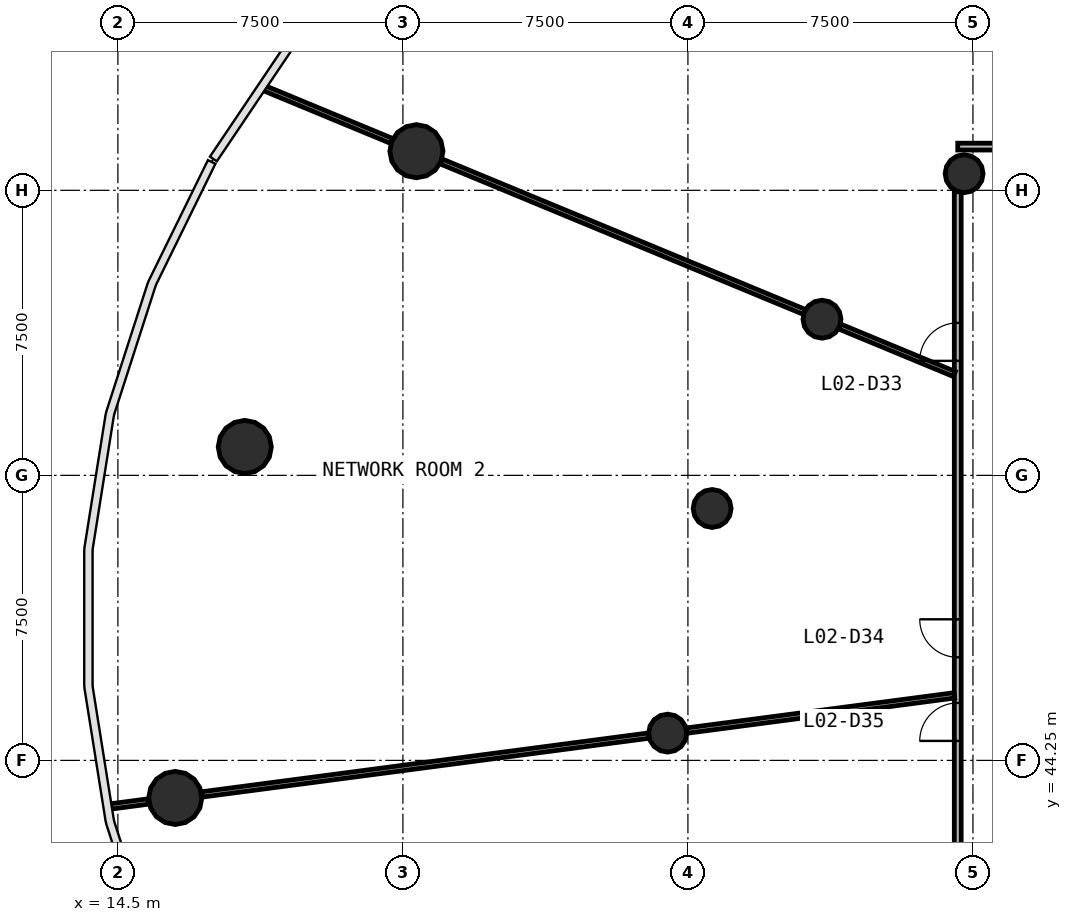
"""IFC4 building model, lengths in metres.
Left out: names, types, materials, properties, quantities, classifications, styles, units other than length and angle.
Written with IfcOpenShell. Run it as: python <this file> out.ifc"""

import sys

from ifc_helpers import new_model, si_unit, direction, frame, frame_2d, origin, origin_2d, place, context, subcontext, project, spatial, rectangle, circle, extrude, source, transform, mapped, element, fill, save


model = new_model("IFC4")
c1 = context("Model", 3, precision=1e-05, world=origin(), true_north=direction((0.0, 1.0)))
c2 = subcontext(c1, "Body", "Model", "MODEL_VIEW")
j1 = project(units=[si_unit("LENGTHUNIT", "METRE"), si_unit("PLANEANGLEUNIT", "RADIAN")], contexts=[c1])
p1 = place(None, origin())
s1 = spatial("IfcSite", under=j1, at=p1, CompositionType="ELEMENT")
p2 = place(p1, origin())
s2 = spatial("IfcBuilding", under=s1, at=p2, CompositionType="ELEMENT")
p3 = place(p2, frame((0.0, 0.0, 9.4)))
s3 = spatial("IfcBuildingStorey", under=s2, at=p3, CompositionType="ELEMENT", Elevation=9.4)
m1 = source(origin(), c2, "Body", "SweptSolid", [
    extrude(circle(Radius=0.7, at=origin_2d()), origin(), (0.0, 0.0, 1.0), 4.4),
])
for number, where, z_axis, x_axis in (
    (1, (22.355, 60.279, 0.0), (0.0, 0.0, 1.0), (1.0, 0.0, 0.0)),
    (2, (17.839, 52.497, 0.0), (0.0, 0.0, 1.0), (1.0, 0.0, 0.0)),
    (3, (16.01, 43.262, 0.0), (0.0, 0.0, 1.0), (1.0, 0.0, 0.0)),
):
    element("IfcColumn", number, at=place(p3, frame(where, z_axis=z_axis, x_axis=x_axis)), inside=s3, PredefinedType="COLUMN", context=c2, shape_type="MappedRepresentation", body=[
        mapped(m1, transform((0.0, 0.0, 0.0), scale=1.0)),
    ])
m2 = source(origin(), c2, "Body", "SweptSolid", [
    extrude(circle(Radius=0.5, at=origin_2d()), origin(), (0.0, 0.0, 1.0), 4.4),
])
for number, where, z_axis, x_axis in (
    (4, (36.768, 59.688, 0.0), (0.0, 0.0, 1.0), (1.0, 0.0, 0.0)),
    (5, (33.028, 55.859, 0.0), (0.0, 0.0, 1.0), (1.0, 0.0, 0.0)),
    (6, (30.137, 50.878, 0.0), (0.0, 0.0, 1.0), (1.0, 0.0, 0.0)),
    (7, (28.966, 44.968, 0.0), (0.0, 0.0, 1.0), (1.0, 0.0, 0.0)),
):
    element("IfcColumn", number, at=place(p3, frame(where, z_axis=z_axis, x_axis=x_axis)), inside=s3, PredefinedType="COLUMN", context=c2, shape_type="MappedRepresentation", body=[
        mapped(m2, transform((0.0, 0.0, 0.0), scale=1.0)),
    ])
p4 = place(p3, frame((36.6, 60.4, 0.0), z_axis=(0.0, 0.0, 1.0), x_axis=(1.0, 0.0, 0.0)))
e8 = element("IfcWall", 8, at=p4, inside=s3, PredefinedType="PARTITIONING", context=c2, shape_type="SweptSolid", body=[
    extrude(rectangle(XDim=30.8, YDim=0.18, at=frame_2d((15.4, 0.0))), origin(), (0.0, 0.0, 1.0), 3.15),
])
p5 = place(p4, frame((22.25, 0.0, 0.0)))
e9 = element("IfcOpeningElement", 9, at=p5, cuts=e8, PredefinedType="OPENING", context=c2, shape_type="SweptSolid", body=[
    extrude(rectangle(XDim=0.9, YDim=2.1, at=frame_2d((0.45, 1.05))), frame((0.0, 0.1, 0.0), z_axis=(0.0, -1.0, 0.0), x_axis=(1.0, 0.0, 0.0)), (0.0, 0.0, 1.0), 0.2),
])
p6 = place(p4, frame((19.65, 0.0, 0.0)))
e10 = element("IfcOpeningElement", 10, at=p6, cuts=e8, PredefinedType="OPENING", context=c2, shape_type="SweptSolid", body=[
    extrude(rectangle(XDim=0.9, YDim=2.1, at=frame_2d((0.45, 1.05))), frame((0.0, 0.1, 0.0), z_axis=(0.0, -1.0, 0.0), x_axis=(1.0, 0.0, 0.0)), (0.0, 0.0, 1.0), 0.2),
])
p7 = place(p4, frame((17.25, 0.0, 0.0)))
e11 = element("IfcOpeningElement", 11, at=p7, cuts=e8, PredefinedType="OPENING", context=c2, shape_type="SweptSolid", body=[
    extrude(rectangle(XDim=0.9, YDim=2.1, at=frame_2d((0.45, 1.05))), frame((0.0, 0.1, 0.0), z_axis=(0.0, -1.0, 0.0), x_axis=(1.0, 0.0, 0.0)), (0.0, 0.0, 1.0), 0.2),
])
p8 = place(p4, frame((14.95, 0.0, 0.0)))
e12 = element("IfcOpeningElement", 12, at=p8, cuts=e8, PredefinedType="OPENING", context=c2, shape_type="SweptSolid", body=[
    extrude(rectangle(XDim=1.0, YDim=2.1, at=frame_2d((0.5, 1.05))), frame((0.0, 0.1, 0.0), z_axis=(0.0, -1.0, 0.0), x_axis=(1.0, 0.0, 0.0)), (0.0, 0.0, 1.0), 0.2),
])
p9 = place(p3, frame((36.6, 35.63, 0.0), z_axis=(0.0, 0.0, 1.0), x_axis=(0.0, 1.0, 0.0)))
e13 = element("IfcWall", 13, at=p9, inside=s3, PredefinedType="PARTITIONING", context=c2, shape_type="SweptSolid", body=[
    extrude(rectangle(XDim=23.583, YDim=0.18, at=frame_2d((11.791, 0.0))), origin(), (0.0, 0.0, 1.0), 3.15),
])
p10 = place(p9, frame((19.133, 0.0, 0.0)))
e14 = element("IfcOpeningElement", 14, at=p10, cuts=e13, PredefinedType="OPENING", context=c2, shape_type="SweptSolid", body=[
    extrude(rectangle(XDim=1.0, YDim=2.1, at=frame_2d((0.5, 1.05))), frame((0.0, 0.1, 0.0), z_axis=(0.0, -1.0, 0.0), x_axis=(1.0, 0.0, 0.0)), (0.0, 0.0, 1.0), 0.2),
])
p11 = place(p9, frame((11.333, 0.0, 0.0)))
e15 = element("IfcOpeningElement", 15, at=p11, cuts=e13, PredefinedType="OPENING", context=c2, shape_type="SweptSolid", body=[
    extrude(rectangle(XDim=1.0, YDim=2.1, at=frame_2d((0.5, 1.05))), frame((0.0, 0.1, 0.0), z_axis=(0.0, -1.0, 0.0), x_axis=(1.0, 0.0, 0.0)), (0.0, 0.0, 1.0), 0.2),
])
p12 = place(p9, frame((9.133, 0.0, 0.0)))
e16 = element("IfcOpeningElement", 16, at=p12, cuts=e13, PredefinedType="OPENING", context=c2, shape_type="SweptSolid", body=[
    extrude(rectangle(XDim=1.0, YDim=2.1, at=frame_2d((0.5, 1.05))), frame((0.0, 0.1, 0.0), z_axis=(0.0, -1.0, 0.0), x_axis=(1.0, 0.0, 0.0)), (0.0, 0.0, 1.0), 0.2),
])
p13 = place(p3, frame((28.466, 44.902, 0.0), z_axis=(0.0, 0.0, 1.0), x_axis=(-0.991446586451, -0.130513088287, 0.0)))
e17 = element("IfcWall", 17, at=p13, inside=s3, PredefinedType="PARTITIONING", context=c2, shape_type="SweptSolid", body=[
    extrude(rectangle(XDim=11.86, YDim=0.14, at=frame_2d((5.93, 0.0))), origin(), (0.0, 0.0, 1.0), 3.15),
])
p14 = place(p3, frame((32.561, 56.052, 0.0), z_axis=(0.0, 0.0, 1.0), x_axis=(-0.923874685699, 0.382695133396, 0.0)))
e18 = element("IfcWall", 18, at=p14, inside=s3, PredefinedType="PARTITIONING", context=c2, shape_type="SweptSolid", body=[
    extrude(rectangle(XDim=10.341, YDim=0.14, at=frame_2d((5.17, 0.0))), origin(), (0.0, 0.0, 1.0), 3.15),
])
p15 = place(p3, frame((40.559, 62.91, 0.0), z_axis=(0.0, 0.0, 1.0), x_axis=(-0.608770769454, 0.793346173028, 0.0)))
e19 = element("IfcWall", 19, at=p15, inside=s3, PredefinedType="PARTITIONING", context=c2, shape_type="SweptSolid", body=[
    extrude(rectangle(XDim=9.079, YDim=0.14, at=frame_2d((4.54, 0.0))), origin(), (0.0, 0.0, 1.0), 3.15),
])
p16 = place(p3, frame((36.51, 45.961, 0.0), z_axis=(0.0, 0.0, 1.0), x_axis=(-0.99144622305, -0.130515848849, 0.0)))
e20 = element("IfcWall", 20, at=p16, inside=s3, PredefinedType="PARTITIONING", context=c2, shape_type="SweptSolid", body=[
    extrude(rectangle(XDim=7.104, YDim=0.14, at=frame_2d((3.552, 0.0))), origin(), (0.0, 0.0, 1.0), 3.15),
])
p17 = place(p3, frame((21.704, 60.549, 0.0), z_axis=(0.0, 0.0, 1.0), x_axis=(-0.923890168451, 0.382657753926, 0.0)))
e21 = element("IfcWall", 21, at=p17, inside=s3, PredefinedType="PARTITIONING", context=c2, shape_type="SweptSolid", body=[
    extrude(rectangle(XDim=3.641, YDim=0.14, at=frame_2d((1.821, 0.0))), origin(), (0.0, 0.0, 1.0), 3.15),
])
p18 = place(p3, frame((36.51, 54.416, 0.0), z_axis=(0.0, 0.0, 1.0), x_axis=(-0.923911109142, 0.382607190737, 0.0)))
e22 = element("IfcWall", 22, at=p18, inside=s3, PredefinedType="PARTITIONING", context=c2, shape_type="SweptSolid", body=[
    extrude(rectangle(XDim=3.264, YDim=0.14, at=frame_2d((1.632, 0.0))), origin(), (0.0, 0.0, 1.0), 3.15),
])
p19 = place(p3, frame((15.311, 43.17, 0.0), z_axis=(0.0, 0.0, 1.0), x_axis=(-0.991417173479, -0.130736330569, 0.0)))
e23 = element("IfcWall", 23, at=p19, inside=s3, PredefinedType="PARTITIONING", context=c2, shape_type="SweptSolid", body=[
    extrude(rectangle(XDim=1.008, YDim=0.14, at=frame_2d((0.504, 0.0))), origin(), (0.0, 0.0, 1.0), 3.15),
])
m3 = source(origin(), c2, "Body", "SweptSolid", [
    extrude(rectangle(XDim=1.0, YDim=2.1, at=frame_2d((0.5, 1.05))), frame((0.0, 0.025, 0.0), z_axis=(0.0, -1.0, 0.0), x_axis=(1.0, 0.0, 0.0)), (0.0, 0.0, 1.0), 0.05),
])
p20 = place(p10, origin())
e24 = element("IfcDoor", 24, at=p20, inside=s3, OperationType="SINGLE_SWING_LEFT", PredefinedType="DOOR", context=c2, shape_type="MappedRepresentation", body=[
    mapped(m3, transform((0.0, 0.0, 0.0), scale=1.0)),
])
fill(e14, e24)
p21 = place(p11, origin())
e25 = element("IfcDoor", 25, at=p21, inside=s3, OperationType="SINGLE_SWING_RIGHT", PredefinedType="DOOR", context=c2, shape_type="MappedRepresentation", body=[
    mapped(m3, transform((0.0, 0.0, 0.0), scale=1.0)),
])
fill(e15, e25)
p22 = place(p12, origin())
e26 = element("IfcDoor", 26, at=p22, inside=s3, OperationType="SINGLE_SWING_LEFT", PredefinedType="DOOR", context=c2, shape_type="MappedRepresentation", body=[
    mapped(m3, transform((0.0, 0.0, 0.0), scale=1.0)),
])
fill(e16, e26)
save(model, sys.argv[1])
